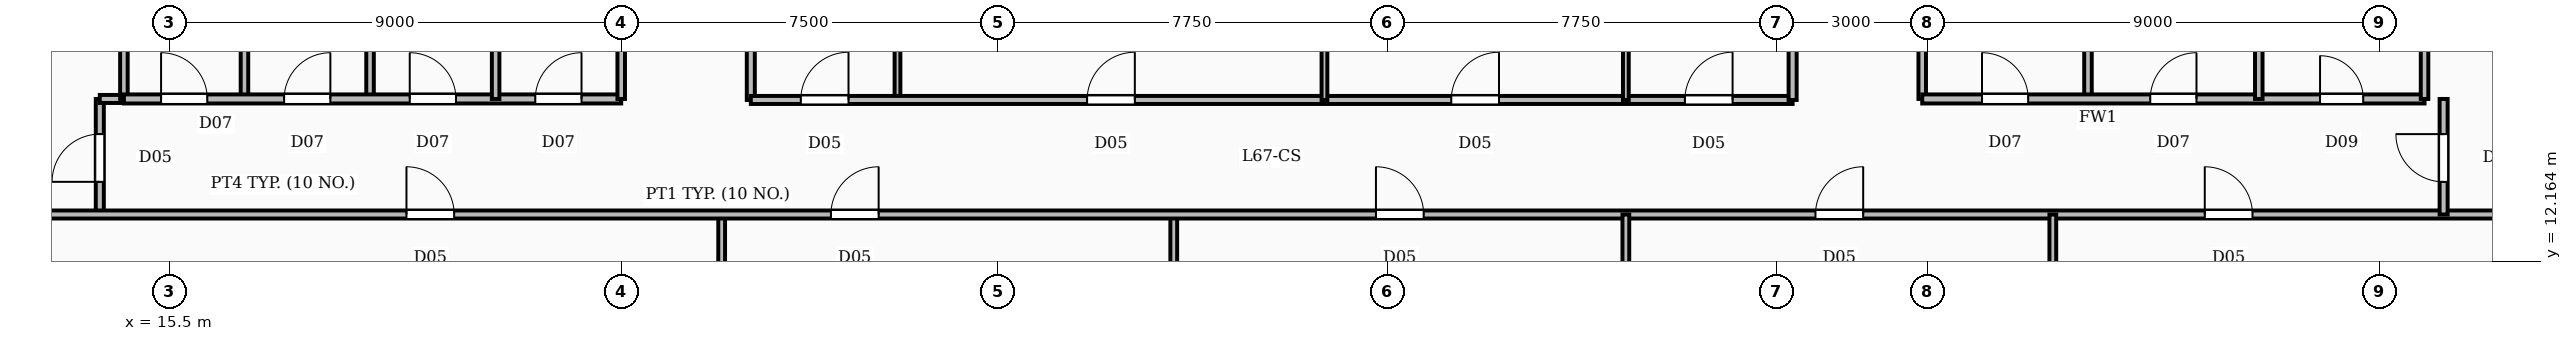
"""IFC4 building model, lengths in metres.
Left out: names, types, materials, properties, quantities, classifications, styles, units other than length and angle.
Written with IfcOpenShell. Run it as: python <this file> out.ifc"""

import sys

from ifc_helpers import new_model, si_unit, direction, frame, frame_2d, origin, place, context, subcontext, project, spatial, rectangle, extrude, element, fill, save


model = new_model("IFC4")
c1 = context("Model", 3, precision=1e-05, world=origin(), true_north=direction((0.0, 1.0)))
c2 = subcontext(c1, "Body", "Model", "MODEL_VIEW")
j1 = project(units=[si_unit("LENGTHUNIT", "METRE"), si_unit("PLANEANGLEUNIT", "RADIAN")], contexts=[c1])
p1 = place(None, origin())
s1 = spatial("IfcSite", under=j1, at=p1, CompositionType="ELEMENT")
p2 = place(p1, origin())
s2 = spatial("IfcBuilding", under=s1, at=p2, CompositionType="ELEMENT")
p3 = place(p2, frame((0.0, 0.0, 274.9)))
s3 = spatial("IfcBuildingStorey", under=s2, at=p3, CompositionType="ELEMENT", Elevation=274.9)
for number, where, z_axis, x_axis in (
    (1, (17.0, 15.4, 0.0), (0.0, 0.0, 1.0), (0.0, 1.0, 0.0)),
    (2, (19.5, 15.4, 0.0), (0.0, 0.0, 1.0), (0.0, 1.0, 0.0)),
    (3, (22.0, 15.4, 0.0), (0.0, 0.0, 1.0), (0.0, 1.0, 0.0)),
):
    element("IfcWall", number, at=place(p3, frame(where, z_axis=z_axis, x_axis=x_axis)), inside=s3, PredefinedType="PARTITIONING", context=c2, shape_type="SweptSolid", body=[
        extrude(rectangle(XDim=3.58, YDim=0.15, at=frame_2d((1.79, 0.0))), origin(), (0.0, 0.0, 1.0), 2.54),
    ])
p4 = place(p3, frame((14.6, 15.4, 0.0), z_axis=(0.0, 0.0, 1.0), x_axis=(1.0, 0.0, 0.0)))
e4 = element("IfcWall", 4, at=p4, inside=s3, PredefinedType="PARTITIONING", context=c2, shape_type="SweptSolid", body=[
    extrude(rectangle(XDim=9.9, YDim=0.18, at=frame_2d((4.95, 0.0))), origin(), (0.0, 0.0, 1.0), 2.54),
])
p5 = place(p4, frame((0.74, 0.0, 0.0)))
e5 = element("IfcOpeningElement", 5, at=p5, cuts=e4, PredefinedType="OPENING", context=c2, shape_type="SweptSolid", body=[
    extrude(rectangle(XDim=0.92, YDim=2.1, at=frame_2d((0.46, 1.05))), frame((0.0, 0.1, 0.0), z_axis=(0.0, -1.0, 0.0), x_axis=(1.0, 0.0, 0.0)), (0.0, 0.0, 1.0), 0.2),
])
p6 = place(p4, frame((3.19, 0.0, 0.0)))
e6 = element("IfcOpeningElement", 6, at=p6, cuts=e4, PredefinedType="OPENING", context=c2, shape_type="SweptSolid", body=[
    extrude(rectangle(XDim=0.92, YDim=2.1, at=frame_2d((0.46, 1.05))), frame((0.0, 0.1, 0.0), z_axis=(0.0, -1.0, 0.0), x_axis=(1.0, 0.0, 0.0)), (0.0, 0.0, 1.0), 0.2),
])
p7 = place(p4, frame((5.69, 0.0, 0.0)))
e7 = element("IfcOpeningElement", 7, at=p7, cuts=e4, PredefinedType="OPENING", context=c2, shape_type="SweptSolid", body=[
    extrude(rectangle(XDim=0.92, YDim=2.1, at=frame_2d((0.46, 1.05))), frame((0.0, 0.1, 0.0), z_axis=(0.0, -1.0, 0.0), x_axis=(1.0, 0.0, 0.0)), (0.0, 0.0, 1.0), 0.2),
])
p8 = place(p4, frame((8.19, 0.0, 0.0)))
e8 = element("IfcOpeningElement", 8, at=p8, cuts=e4, PredefinedType="OPENING", context=c2, shape_type="SweptSolid", body=[
    extrude(rectangle(XDim=0.92, YDim=2.1, at=frame_2d((0.46, 1.05))), frame((0.0, 0.1, 0.0), z_axis=(0.0, -1.0, 0.0), x_axis=(1.0, 0.0, 0.0)), (0.0, 0.0, 1.0), 0.2),
])
for number, where, z_axis, x_axis in (
    (9, (14.6, 15.4, 0.0), (0.0, 0.0, 1.0), (0.0, 1.0, 0.0)),
    (10, (24.5, 15.4, 0.0), (0.0, 0.0, 1.0), (0.0, 1.0, 0.0)),
    (11, (53.7, 15.4, 0.0), (0.0, 0.0, 1.0), (0.0, 1.0, 0.0)),
    (12, (57.1, 15.4, 0.0), (0.0, 0.0, 1.0), (0.0, 1.0, 0.0)),
):
    element("IfcWall", number, at=place(p3, frame(where, z_axis=z_axis, x_axis=x_axis)), inside=s3, PredefinedType="PARTITIONING", context=c2, shape_type="SweptSolid", body=[
        extrude(rectangle(XDim=3.58, YDim=0.15, at=frame_2d((1.79, 0.0))), origin(), (0.0, 0.0, 1.0), 2.54),
    ])
p9 = place(p3, frame((50.4, 15.4, 0.0), z_axis=(0.0, 0.0, 1.0), x_axis=(1.0, 0.0, 0.0)))
e13 = element("IfcWall", 13, at=p9, inside=s3, PredefinedType="SOLIDWALL", context=c2, shape_type="SweptSolid", body=[
    extrude(rectangle(XDim=10.0, YDim=0.18, at=frame_2d((5.0, 0.0))), origin(), (0.0, 0.0, 1.0), 2.54),
])
p10 = place(p9, frame((1.19, 0.0, 0.0)))
e14 = element("IfcOpeningElement", 14, at=p10, cuts=e13, PredefinedType="OPENING", context=c2, shape_type="SweptSolid", body=[
    extrude(rectangle(XDim=0.92, YDim=2.1, at=frame_2d((0.46, 1.05))), frame((0.0, 0.1, 0.0), z_axis=(0.0, -1.0, 0.0), x_axis=(1.0, 0.0, 0.0)), (0.0, 0.0, 1.0), 0.2),
])
p11 = place(p9, frame((4.54, 0.0, 0.0)))
e15 = element("IfcOpeningElement", 15, at=p11, cuts=e13, PredefinedType="OPENING", context=c2, shape_type="SweptSolid", body=[
    extrude(rectangle(XDim=0.92, YDim=2.1, at=frame_2d((0.46, 1.05))), frame((0.0, 0.1, 0.0), z_axis=(0.0, -1.0, 0.0), x_axis=(1.0, 0.0, 0.0)), (0.0, 0.0, 1.0), 0.2),
])
p12 = place(p9, frame((7.92, 0.0, 0.0)))
e16 = element("IfcOpeningElement", 16, at=p12, cuts=e13, PredefinedType="OPENING", context=c2, shape_type="SweptSolid", body=[
    extrude(rectangle(XDim=0.86, YDim=2.05, at=frame_2d((0.43, 1.025))), frame((0.0, 0.1, 0.0), z_axis=(0.0, -1.0, 0.0), x_axis=(1.0, 0.0, 0.0)), (0.0, 0.0, 1.0), 0.2),
])
for number, where, z_axis, x_axis in (
    (17, (50.4, 15.4, 0.0), (0.0, 0.0, 1.0), (0.0, 1.0, 0.0)),
    (18, (60.4, 15.4, 0.0), (0.0, 0.0, 1.0), (0.0, 1.0, 0.0)),
):
    element("IfcWall", number, at=place(p3, frame(where, z_axis=z_axis, x_axis=x_axis)), inside=s3, PredefinedType="PARTITIONING", context=c2, shape_type="SweptSolid", body=[
        extrude(rectangle(XDim=3.58, YDim=0.15, at=frame_2d((1.79, 0.0))), origin(), (0.0, 0.0, 1.0), 2.54),
    ])
p13 = place(p3, frame((26.5, 6.665, 0.0), z_axis=(0.0, 0.0, 1.0), x_axis=(0.0, 1.0, 0.0)))
e19 = element("IfcWall", 19, at=p13, inside=s3, PredefinedType="PARTITIONING", context=c2, shape_type="SweptSolid", body=[
    extrude(rectangle(XDim=6.436, YDim=0.135, at=frame_2d((3.218, 0.0))), origin(), (0.0, 0.0, 1.0), 2.54),
])
p14 = place(p3, frame((35.5, 6.743, 0.0), z_axis=(0.0, 0.0, 1.0), x_axis=(0.0, 1.0, 0.0)))
e20 = element("IfcWall", 20, at=p14, inside=s3, PredefinedType="PARTITIONING", context=c2, shape_type="SweptSolid", body=[
    extrude(rectangle(XDim=6.357, YDim=0.135, at=frame_2d((3.178, 0.0))), origin(), (0.0, 0.0, 1.0), 2.54),
])
p15 = place(p3, frame((44.5, 6.822, 0.0), z_axis=(0.0, 0.0, 1.0), x_axis=(0.0, 1.0, 0.0)))
e21 = element("IfcWall", 21, at=p15, inside=s3, PredefinedType="PARTITIONING", context=c2, shape_type="SweptSolid", body=[
    extrude(rectangle(XDim=6.279, YDim=0.135, at=frame_2d((3.139, 0.0))), origin(), (0.0, 0.0, 1.0), 2.54),
])
p16 = place(p3, frame((53.0, 6.896, 0.0), z_axis=(0.0, 0.0, 1.0), x_axis=(0.0, 1.0, 0.0)))
e22 = element("IfcWall", 22, at=p16, inside=s3, PredefinedType="PARTITIONING", context=c2, shape_type="SweptSolid", body=[
    extrude(rectangle(XDim=6.204, YDim=0.135, at=frame_2d((3.102, 0.0))), origin(), (0.0, 0.0, 1.0), 2.54),
])
p17 = place(p3, frame((8.79, 13.1, 0.0), z_axis=(0.0, 0.0, 1.0), x_axis=(1.0, 0.0, 0.0)))
e23 = element("IfcWall", 23, at=p17, inside=s3, PredefinedType="PARTITIONING", context=c2, shape_type="SweptSolid", body=[
    extrude(rectangle(XDim=55.102, YDim=0.16, at=frame_2d((27.551, 0.0))), origin(), (0.0, 0.0, 1.0), 2.54),
])
p18 = place(p17, frame((11.435, 0.0, 0.0)))
e24 = element("IfcOpeningElement", 24, at=p18, cuts=e23, PredefinedType="OPENING", context=c2, shape_type="SweptSolid", body=[
    extrude(rectangle(XDim=0.95, YDim=2.15, at=frame_2d((0.475, 1.075))), frame((0.0, 0.09, 0.0), z_axis=(0.0, -1.0, 0.0), x_axis=(1.0, 0.0, 0.0)), (0.0, 0.0, 1.0), 0.18),
])
p19 = place(p17, frame((19.885, 0.0, 0.0)))
e25 = element("IfcOpeningElement", 25, at=p19, cuts=e23, PredefinedType="OPENING", context=c2, shape_type="SweptSolid", body=[
    extrude(rectangle(XDim=0.95, YDim=2.15, at=frame_2d((0.475, 1.075))), frame((0.0, 0.09, 0.0), z_axis=(0.0, -1.0, 0.0), x_axis=(1.0, 0.0, 0.0)), (0.0, 0.0, 1.0), 0.18),
])
p20 = place(p17, frame((30.735, 0.0, 0.0)))
e26 = element("IfcOpeningElement", 26, at=p20, cuts=e23, PredefinedType="OPENING", context=c2, shape_type="SweptSolid", body=[
    extrude(rectangle(XDim=0.95, YDim=2.15, at=frame_2d((0.475, 1.075))), frame((0.0, 0.09, 0.0), z_axis=(0.0, -1.0, 0.0), x_axis=(1.0, 0.0, 0.0)), (0.0, 0.0, 1.0), 0.18),
])
p21 = place(p17, frame((39.485, 0.0, 0.0)))
e27 = element("IfcOpeningElement", 27, at=p21, cuts=e23, PredefinedType="OPENING", context=c2, shape_type="SweptSolid", body=[
    extrude(rectangle(XDim=0.95, YDim=2.15, at=frame_2d((0.475, 1.075))), frame((0.0, 0.09, 0.0), z_axis=(0.0, -1.0, 0.0), x_axis=(1.0, 0.0, 0.0)), (0.0, 0.0, 1.0), 0.18),
])
p22 = place(p17, frame((47.235, 0.0, 0.0)))
e28 = element("IfcOpeningElement", 28, at=p22, cuts=e23, PredefinedType="OPENING", context=c2, shape_type="SweptSolid", body=[
    extrude(rectangle(XDim=0.95, YDim=2.15, at=frame_2d((0.475, 1.075))), frame((0.0, 0.09, 0.0), z_axis=(0.0, -1.0, 0.0), x_axis=(1.0, 0.0, 0.0)), (0.0, 0.0, 1.0), 0.18),
])
for number, where, z_axis, x_axis in (
    (29, (30.0, 15.38, 0.0), (0.0, 0.0, 1.0), (0.0, 1.0, 0.0)),
    (30, (38.5, 15.38, 0.0), (0.0, 0.0, 1.0), (0.0, 1.0, 0.0)),
    (31, (44.5, 15.38, 0.0), (0.0, 0.0, 1.0), (0.0, 1.0, 0.0)),
):
    element("IfcWall", number, at=place(p3, frame(where, z_axis=z_axis, x_axis=x_axis)), inside=s3, PredefinedType="PARTITIONING", context=c2, shape_type="SweptSolid", body=[
        extrude(rectangle(XDim=19.6, YDim=0.115, at=frame_2d((9.8, 0.0))), origin(), (0.0, 0.0, 1.0), 2.54),
    ])
p23 = place(p3, frame((27.08, 15.38, 0.0), z_axis=(0.0, 0.0, 1.0), x_axis=(1.0, 0.0, 0.0)))
e32 = element("IfcWall", 32, at=p23, inside=s3, PredefinedType="PARTITIONING", context=c2, shape_type="SweptSolid", body=[
    extrude(rectangle(XDim=20.74, YDim=0.16, at=frame_2d((10.37, 0.0))), origin(), (0.0, 0.0, 1.0), 2.54),
])
p24 = place(p23, frame((0.995, 0.0, 0.0)))
e33 = element("IfcOpeningElement", 33, at=p24, cuts=e32, PredefinedType="OPENING", context=c2, shape_type="SweptSolid", body=[
    extrude(rectangle(XDim=0.95, YDim=2.15, at=frame_2d((0.475, 1.075))), frame((0.0, 0.09, 0.0), z_axis=(0.0, -1.0, 0.0), x_axis=(1.0, 0.0, 0.0)), (0.0, 0.0, 1.0), 0.18),
])
p25 = place(p23, frame((6.695, 0.0, 0.0)))
e34 = element("IfcOpeningElement", 34, at=p25, cuts=e32, PredefinedType="OPENING", context=c2, shape_type="SweptSolid", body=[
    extrude(rectangle(XDim=0.95, YDim=2.15, at=frame_2d((0.475, 1.075))), frame((0.0, 0.09, 0.0), z_axis=(0.0, -1.0, 0.0), x_axis=(1.0, 0.0, 0.0)), (0.0, 0.0, 1.0), 0.18),
])
p26 = place(p23, frame((13.945, 0.0, 0.0)))
e35 = element("IfcOpeningElement", 35, at=p26, cuts=e32, PredefinedType="OPENING", context=c2, shape_type="SweptSolid", body=[
    extrude(rectangle(XDim=0.95, YDim=2.15, at=frame_2d((0.475, 1.075))), frame((0.0, 0.09, 0.0), z_axis=(0.0, -1.0, 0.0), x_axis=(1.0, 0.0, 0.0)), (0.0, 0.0, 1.0), 0.18),
])
p27 = place(p23, frame((18.595, 0.0, 0.0)))
e36 = element("IfcOpeningElement", 36, at=p27, cuts=e32, PredefinedType="OPENING", context=c2, shape_type="SweptSolid", body=[
    extrude(rectangle(XDim=0.95, YDim=2.15, at=frame_2d((0.475, 1.075))), frame((0.0, 0.09, 0.0), z_axis=(0.0, -1.0, 0.0), x_axis=(1.0, 0.0, 0.0)), (0.0, 0.0, 1.0), 0.18),
])
for number, where, z_axis, x_axis in (
    (37, (27.08, 15.38, 0.0), (0.0, 0.0, 1.0), (0.0, 1.0, 0.0)),
    (38, (47.82, 15.38, 0.0), (0.0, 0.0, 1.0), (0.0, 1.0, 0.0)),
):
    element("IfcWall", number, at=place(p3, frame(where, z_axis=z_axis, x_axis=x_axis)), inside=s3, PredefinedType="PARTITIONING", context=c2, shape_type="SweptSolid", body=[
        extrude(rectangle(XDim=19.6, YDim=0.16, at=frame_2d((9.8, 0.0))), origin(), (0.0, 0.0, 1.0), 2.54),
    ])
p28 = place(p3, frame((14.12, 13.1, 0.0), z_axis=(0.0, 0.0, 1.0), x_axis=(0.0, 1.0, 0.0)))
e39 = element("IfcWall", 39, at=p28, inside=s3, PredefinedType="PARTITIONING", context=c2, shape_type="SweptSolid", body=[
    extrude(rectangle(XDim=2.3, YDim=0.16, at=frame_2d((1.15, 0.0))), origin(), (0.0, 0.0, 1.0), 2.54),
])
p29 = place(p28, frame((0.65, 0.0, 0.0)))
e40 = element("IfcOpeningElement", 40, at=p29, cuts=e39, PredefinedType="OPENING", context=c2, shape_type="SweptSolid", body=[
    extrude(rectangle(XDim=0.95, YDim=2.15, at=frame_2d((0.475, 1.075))), frame((0.0, 0.09, 0.0), z_axis=(0.0, -1.0, 0.0), x_axis=(1.0, 0.0, 0.0)), (0.0, 0.0, 1.0), 0.18),
])
p30 = place(p3, frame((14.12, 15.4, 0.0), z_axis=(0.0, 0.0, 1.0), x_axis=(1.0, 0.0, 0.0)))
e41 = element("IfcWall", 41, at=p30, inside=s3, PredefinedType="PARTITIONING", context=c2, shape_type="SweptSolid", body=[
    extrude(rectangle(XDim=0.5, YDim=0.16, at=frame_2d((0.25, 0.0))), origin(), (0.0, 0.0, 1.0), 2.54),
])
p31 = place(p3, frame((60.78, 13.1, 0.0), z_axis=(0.0, 0.0, 1.0), x_axis=(0.0, 1.0, 0.0)))
e42 = element("IfcWall", 42, at=p31, inside=s3, PredefinedType="PARTITIONING", context=c2, shape_type="SweptSolid", body=[
    extrude(rectangle(XDim=2.3, YDim=0.16, at=frame_2d((1.15, 0.0))), origin(), (0.0, 0.0, 1.0), 2.54),
])
p32 = place(p31, frame((0.65, 0.0, 0.0)))
e43 = element("IfcOpeningElement", 43, at=p32, cuts=e42, PredefinedType="OPENING", context=c2, shape_type="SweptSolid", body=[
    extrude(rectangle(XDim=0.95, YDim=2.15, at=frame_2d((0.475, 1.075))), frame((0.0, 0.09, 0.0), z_axis=(0.0, -1.0, 0.0), x_axis=(1.0, 0.0, 0.0)), (0.0, 0.0, 1.0), 0.18),
])
p33 = place(p5, origin())
e44 = element("IfcDoor", 44, at=p33, inside=s3, OperationType="SINGLE_SWING_LEFT", PredefinedType="DOOR", context=c2, shape_type="SweptSolid", body=[
    extrude(rectangle(XDim=0.92, YDim=2.1, at=frame_2d((0.46, 1.05))), frame((0.0, 0.025, 0.0), z_axis=(0.0, -1.0, 0.0), x_axis=(1.0, 0.0, 0.0)), (0.0, 0.0, 1.0), 0.05),
])
fill(e5, e44)
p34 = place(p6, origin())
e45 = element("IfcDoor", 45, at=p34, inside=s3, OperationType="SINGLE_SWING_RIGHT", PredefinedType="DOOR", context=c2, shape_type="SweptSolid", body=[
    extrude(rectangle(XDim=0.92, YDim=2.1, at=frame_2d((0.46, 1.05))), frame((0.0, 0.025, 0.0), z_axis=(0.0, -1.0, 0.0), x_axis=(1.0, 0.0, 0.0)), (0.0, 0.0, 1.0), 0.05),
])
fill(e6, e45)
p35 = place(p7, origin())
e46 = element("IfcDoor", 46, at=p35, inside=s3, OperationType="SINGLE_SWING_LEFT", PredefinedType="DOOR", context=c2, shape_type="SweptSolid", body=[
    extrude(rectangle(XDim=0.92, YDim=2.1, at=frame_2d((0.46, 1.05))), frame((0.0, 0.025, 0.0), z_axis=(0.0, -1.0, 0.0), x_axis=(1.0, 0.0, 0.0)), (0.0, 0.0, 1.0), 0.05),
])
fill(e7, e46)
p36 = place(p8, origin())
e47 = element("IfcDoor", 47, at=p36, inside=s3, OperationType="SINGLE_SWING_RIGHT", PredefinedType="DOOR", context=c2, shape_type="SweptSolid", body=[
    extrude(rectangle(XDim=0.92, YDim=2.1, at=frame_2d((0.46, 1.05))), frame((0.0, 0.025, 0.0), z_axis=(0.0, -1.0, 0.0), x_axis=(1.0, 0.0, 0.0)), (0.0, 0.0, 1.0), 0.05),
])
fill(e8, e47)
p37 = place(p10, origin())
e48 = element("IfcDoor", 48, at=p37, inside=s3, OperationType="SINGLE_SWING_LEFT", PredefinedType="DOOR", context=c2, shape_type="SweptSolid", body=[
    extrude(rectangle(XDim=0.92, YDim=2.1, at=frame_2d((0.46, 1.05))), frame((0.0, 0.025, 0.0), z_axis=(0.0, -1.0, 0.0), x_axis=(1.0, 0.0, 0.0)), (0.0, 0.0, 1.0), 0.05),
])
fill(e14, e48)
p38 = place(p11, origin())
e49 = element("IfcDoor", 49, at=p38, inside=s3, OperationType="SINGLE_SWING_RIGHT", PredefinedType="DOOR", context=c2, shape_type="SweptSolid", body=[
    extrude(rectangle(XDim=0.92, YDim=2.1, at=frame_2d((0.46, 1.05))), frame((0.0, 0.025, 0.0), z_axis=(0.0, -1.0, 0.0), x_axis=(1.0, 0.0, 0.0)), (0.0, 0.0, 1.0), 0.05),
])
fill(e15, e49)
p39 = place(p12, origin())
e50 = element("IfcDoor", 50, at=p39, inside=s3, OperationType="SINGLE_SWING_LEFT", PredefinedType="DOOR", context=c2, shape_type="SweptSolid", body=[
    extrude(rectangle(XDim=0.86, YDim=2.05, at=frame_2d((0.43, 1.025))), frame((0.0, 0.025, 0.0), z_axis=(0.0, -1.0, 0.0), x_axis=(1.0, 0.0, 0.0)), (0.0, 0.0, 1.0), 0.05),
])
fill(e16, e50)
p40 = place(p18, origin())
e51 = element("IfcDoor", 51, at=p40, inside=s3, OperationType="SINGLE_SWING_LEFT", PredefinedType="DOOR", context=c2, shape_type="SweptSolid", body=[
    extrude(rectangle(XDim=0.95, YDim=2.15, at=frame_2d((0.475, 1.075))), frame((0.0, 0.025, 0.0), z_axis=(0.0, -1.0, 0.0), x_axis=(1.0, 0.0, 0.0)), (0.0, 0.0, 1.0), 0.05),
])
fill(e24, e51)
p41 = place(p19, origin())
e52 = element("IfcDoor", 52, at=p41, inside=s3, OperationType="SINGLE_SWING_RIGHT", PredefinedType="DOOR", context=c2, shape_type="SweptSolid", body=[
    extrude(rectangle(XDim=0.95, YDim=2.15, at=frame_2d((0.475, 1.075))), frame((0.0, 0.025, 0.0), z_axis=(0.0, -1.0, 0.0), x_axis=(1.0, 0.0, 0.0)), (0.0, 0.0, 1.0), 0.05),
])
fill(e25, e52)
p42 = place(p20, origin())
e53 = element("IfcDoor", 53, at=p42, inside=s3, OperationType="SINGLE_SWING_LEFT", PredefinedType="DOOR", context=c2, shape_type="SweptSolid", body=[
    extrude(rectangle(XDim=0.95, YDim=2.15, at=frame_2d((0.475, 1.075))), frame((0.0, 0.025, 0.0), z_axis=(0.0, -1.0, 0.0), x_axis=(1.0, 0.0, 0.0)), (0.0, 0.0, 1.0), 0.05),
])
fill(e26, e53)
p43 = place(p21, origin())
e54 = element("IfcDoor", 54, at=p43, inside=s3, OperationType="SINGLE_SWING_RIGHT", PredefinedType="DOOR", context=c2, shape_type="SweptSolid", body=[
    extrude(rectangle(XDim=0.95, YDim=2.15, at=frame_2d((0.475, 1.075))), frame((0.0, 0.025, 0.0), z_axis=(0.0, -1.0, 0.0), x_axis=(1.0, 0.0, 0.0)), (0.0, 0.0, 1.0), 0.05),
])
fill(e27, e54)
p44 = place(p22, origin())
e55 = element("IfcDoor", 55, at=p44, inside=s3, OperationType="SINGLE_SWING_LEFT", PredefinedType="DOOR", context=c2, shape_type="SweptSolid", body=[
    extrude(rectangle(XDim=0.95, YDim=2.15, at=frame_2d((0.475, 1.075))), frame((0.0, 0.025, 0.0), z_axis=(0.0, -1.0, 0.0), x_axis=(1.0, 0.0, 0.0)), (0.0, 0.0, 1.0), 0.05),
])
fill(e28, e55)
p45 = place(p24, origin())
e56 = element("IfcDoor", 56, at=p45, inside=s3, OperationType="SINGLE_SWING_RIGHT", PredefinedType="DOOR", context=c2, shape_type="SweptSolid", body=[
    extrude(rectangle(XDim=0.95, YDim=2.15, at=frame_2d((0.475, 1.075))), frame((0.0, 0.025, 0.0), z_axis=(0.0, -1.0, 0.0), x_axis=(1.0, 0.0, 0.0)), (0.0, 0.0, 1.0), 0.05),
])
fill(e33, e56)
p46 = place(p25, origin())
e57 = element("IfcDoor", 57, at=p46, inside=s3, OperationType="SINGLE_SWING_RIGHT", PredefinedType="DOOR", context=c2, shape_type="SweptSolid", body=[
    extrude(rectangle(XDim=0.95, YDim=2.15, at=frame_2d((0.475, 1.075))), frame((0.0, 0.025, 0.0), z_axis=(0.0, -1.0, 0.0), x_axis=(1.0, 0.0, 0.0)), (0.0, 0.0, 1.0), 0.05),
])
fill(e34, e57)
p47 = place(p26, origin())
e58 = element("IfcDoor", 58, at=p47, inside=s3, OperationType="SINGLE_SWING_RIGHT", PredefinedType="DOOR", context=c2, shape_type="SweptSolid", body=[
    extrude(rectangle(XDim=0.95, YDim=2.15, at=frame_2d((0.475, 1.075))), frame((0.0, 0.025, 0.0), z_axis=(0.0, -1.0, 0.0), x_axis=(1.0, 0.0, 0.0)), (0.0, 0.0, 1.0), 0.05),
])
fill(e35, e58)
p48 = place(p27, origin())
e59 = element("IfcDoor", 59, at=p48, inside=s3, OperationType="SINGLE_SWING_RIGHT", PredefinedType="DOOR", context=c2, shape_type="SweptSolid", body=[
    extrude(rectangle(XDim=0.95, YDim=2.15, at=frame_2d((0.475, 1.075))), frame((0.0, 0.025, 0.0), z_axis=(0.0, -1.0, 0.0), x_axis=(1.0, 0.0, 0.0)), (0.0, 0.0, 1.0), 0.05),
])
fill(e36, e59)
p49 = place(p29, origin())
e60 = element("IfcDoor", 60, at=p49, inside=s3, OperationType="SINGLE_SWING_LEFT", PredefinedType="DOOR", context=c2, shape_type="SweptSolid", body=[
    extrude(rectangle(XDim=0.95, YDim=2.15, at=frame_2d((0.475, 1.075))), frame((0.0, 0.025, 0.0), z_axis=(0.0, -1.0, 0.0), x_axis=(1.0, 0.0, 0.0)), (0.0, 0.0, 1.0), 0.05),
])
fill(e40, e60)
p50 = place(p32, origin())
e61 = element("IfcDoor", 61, at=p50, inside=s3, OperationType="SINGLE_SWING_RIGHT", PredefinedType="DOOR", context=c2, shape_type="SweptSolid", body=[
    extrude(rectangle(XDim=0.95, YDim=2.15, at=frame_2d((0.475, 1.075))), frame((0.0, 0.025, 0.0), z_axis=(0.0, -1.0, 0.0), x_axis=(1.0, 0.0, 0.0)), (0.0, 0.0, 1.0), 0.05),
])
fill(e43, e61)
save(model, sys.argv[1])
